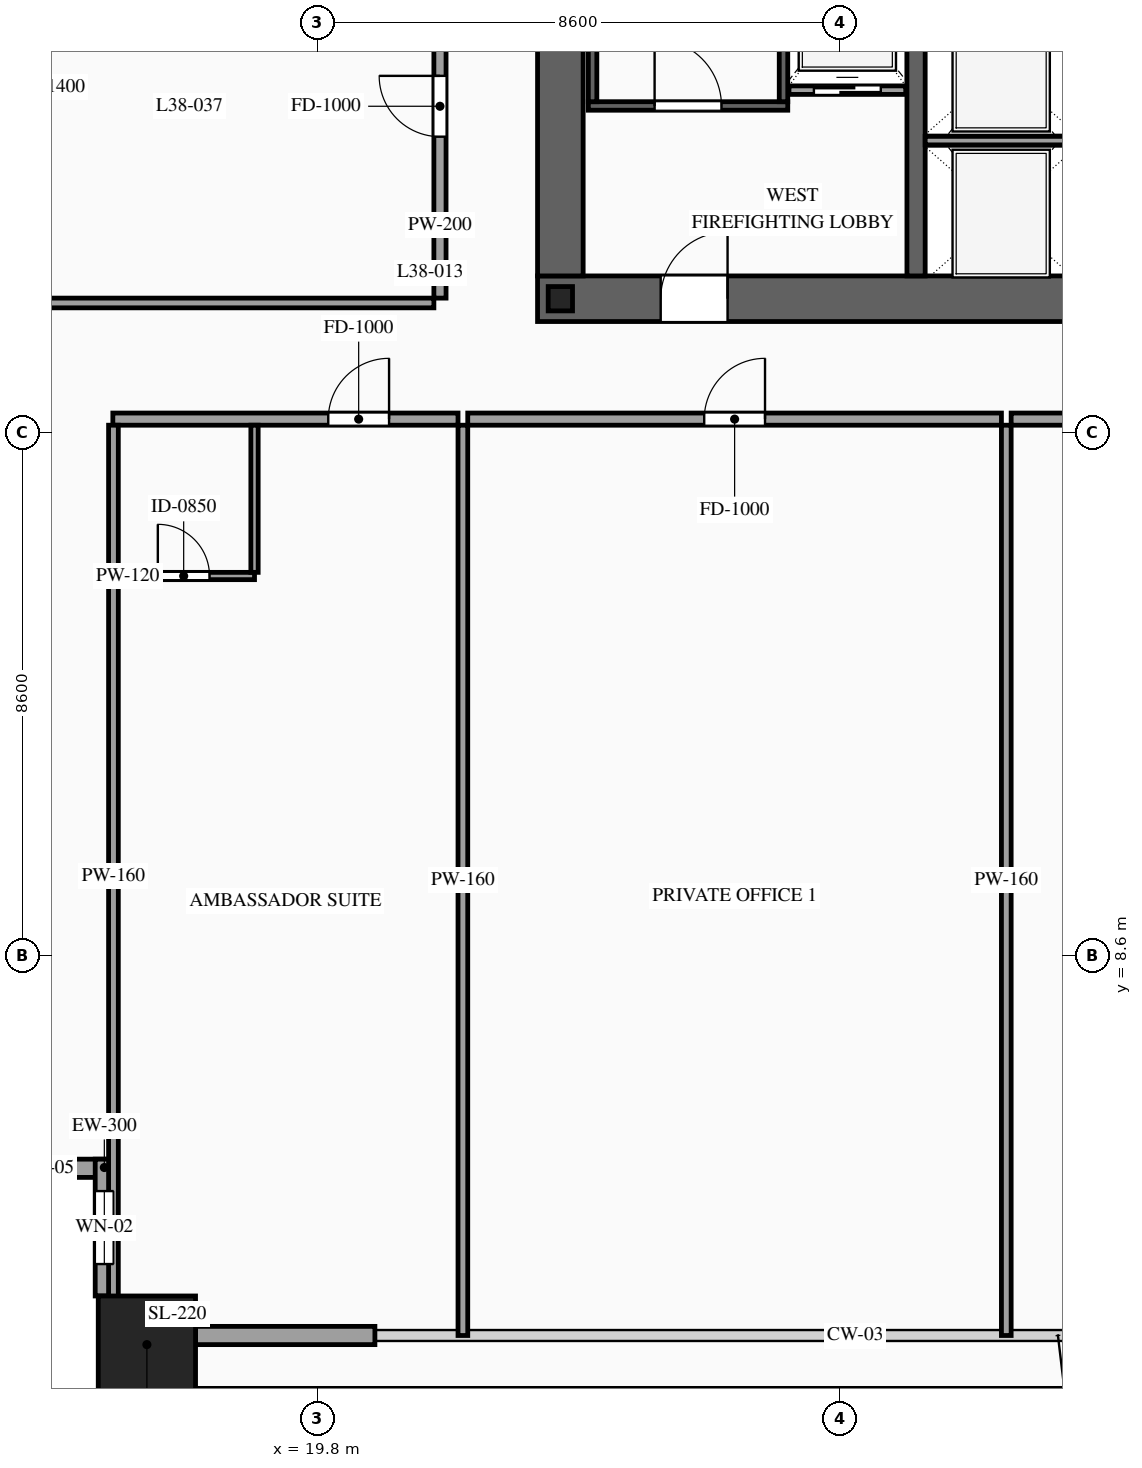
"""IFC4 building model, lengths in metres.
Left out: names, types, materials, properties, quantities, classifications, styles, units other than length and angle.
Written with IfcOpenShell. Run it as: python <this file> out.ifc"""

import sys

from ifc_helpers import new_model, si_unit, direction, frame, frame_2d, origin, origin_2d, place, context, subcontext, project, spatial, rectangle, hollow_rectangle, i_section, extrude, source, transform, mapped, element, fill, save


model = new_model("IFC4")
c1 = context("Model", 3, precision=1e-05, world=origin(), true_north=direction((0.0, 1.0)))
c2 = subcontext(c1, "Body", "Model", "MODEL_VIEW")
j1 = project(units=[si_unit("LENGTHUNIT", "METRE"), si_unit("PLANEANGLEUNIT", "RADIAN")], contexts=[c1])
p1 = place(None, origin())
s1 = spatial("IfcSite", under=j1, at=p1, CompositionType="ELEMENT")
p2 = place(p1, origin())
s2 = spatial("IfcBuilding", under=s1, at=p2, CompositionType="ELEMENT")
p3 = place(p2, frame((0.0, 0.0, 145.2)))
s3 = spatial("IfcBuildingStorey", under=s2, at=p3, CompositionType="ELEMENT", Elevation=145.2)
p4 = place(p3, frame((23.425, 19.4, 0.0), z_axis=(0.0, 0.0, 1.0), x_axis=(1.0, 0.0, 0.0)))
e1 = element("IfcWall", 1, at=p4, inside=s3, PredefinedType="SHEAR", context=c2, shape_type="SweptSolid", body=[
    extrude(rectangle(XDim=27.15, YDim=0.75, at=frame_2d((13.575, 0.0))), origin(), (0.0, 0.0, 1.0), 3.6),
])
p5 = place(p4, frame((2.025, 0.0, 0.0)))
e2 = element("IfcOpeningElement", 2, at=p5, cuts=e1, PredefinedType="OPENING", context=c2, shape_type="SweptSolid", body=[
    extrude(rectangle(XDim=1.1, YDim=2.2, at=frame_2d((0.55, 1.1))), frame((0.0, 0.39, 0.0), z_axis=(0.0, -1.0, 0.0), x_axis=(1.0, 0.0, 0.0)), (0.0, 0.0, 1.0), 0.78),
])
p6 = place(p4, frame((9.925, 0.0, 0.0)))
e3 = element("IfcOpeningElement", 3, at=p6, cuts=e1, PredefinedType="OPENING", context=c2, shape_type="SweptSolid", body=[
    extrude(rectangle(XDim=1.1, YDim=2.2, at=frame_2d((0.55, 1.1))), frame((0.0, 0.39, 0.0), z_axis=(0.0, -1.0, 0.0), x_axis=(1.0, 0.0, 0.0)), (0.0, 0.0, 1.0), 0.78),
])
p7 = place(p4, frame((23.125, 0.0, 0.0)))
e4 = element("IfcOpeningElement", 4, at=p7, cuts=e1, PredefinedType="OPENING", context=c2, shape_type="SweptSolid", body=[
    extrude(rectangle(XDim=1.1, YDim=2.2, at=frame_2d((0.55, 1.1))), frame((0.0, 0.39, 0.0), z_axis=(0.0, -1.0, 0.0), x_axis=(1.0, 0.0, 0.0)), (0.0, 0.0, 1.0), 0.78),
])
p8 = place(p4, frame((19.745, 0.0, 0.0)))
e5 = element("IfcOpeningElement", 5, at=p8, cuts=e1, PredefinedType="OPENING", context=c2, shape_type="SweptSolid", body=[
    extrude(rectangle(XDim=0.9, YDim=2.15, at=frame_2d((0.45, 1.075))), frame((0.0, 0.39, 0.0), z_axis=(0.0, -1.0, 0.0), x_axis=(1.0, 0.0, 0.0)), (0.0, 0.0, 1.0), 0.78),
])
p9 = place(p4, frame((18.305, 0.0, 0.0)))
e6 = element("IfcOpeningElement", 6, at=p9, cuts=e1, PredefinedType="OPENING", context=c2, shape_type="SweptSolid", body=[
    extrude(rectangle(XDim=0.9, YDim=2.15, at=frame_2d((0.45, 1.075))), frame((0.0, 0.39, 0.0), z_axis=(0.0, -1.0, 0.0), x_axis=(1.0, 0.0, 0.0)), (0.0, 0.0, 1.0), 0.78),
])
m1 = source(origin(), c2, "Body", "SweptSolid", [
    extrude(rectangle(XDim=12.05, YDim=0.75, at=frame_2d((6.025, 0.0))), origin(), (0.0, 0.0, 1.0), 3.6),
])
p10 = place(p3, frame((23.8, 19.775, 0.0), z_axis=(0.0, 0.0, 1.0), x_axis=(0.0, 1.0, 0.0)))
e7 = element("IfcWall", 7, at=p10, inside=s3, PredefinedType="SHEAR", context=c2, shape_type="MappedRepresentation", body=[
    mapped(m1, transform((0.0, 0.0, 0.0), scale=1.0)),
])
m2 = source(origin(), c2, "Body", "SweptSolid", [
    extrude(rectangle(XDim=12.05, YDim=0.3, at=frame_2d((6.025, 0.0))), origin(), (0.0, 0.0, 1.0), 3.6),
])
p11 = place(p3, frame((29.65, 19.775, 0.0), z_axis=(0.0, 0.0, 1.0), x_axis=(0.0, 1.0, 0.0)))
e8 = element("IfcWall", 8, at=p11, inside=s3, PredefinedType="SOLIDWALL", context=c2, shape_type="MappedRepresentation", body=[
    mapped(m2, transform((0.0, 0.0, 0.0), scale=1.0)),
])
m3 = source(origin(), c2, "Body", "SweptSolid", [
    extrude(i_section(OverallWidth=0.4, OverallDepth=0.4, WebThickness=0.013, FlangeThickness=0.021, at=origin_2d()), origin(), (0.0, 0.0, 1.0), 3.6),
])
p12 = place(p3, frame((23.8, 19.4, 0.0), z_axis=(0.0, 0.0, 1.0), x_axis=(1.0, 0.0, 0.0)))
e9 = element("IfcColumn", 9, at=p12, inside=s3, PredefinedType="COLUMN", context=c2, shape_type="MappedRepresentation", body=[
    mapped(m3, transform((0.0, 0.0, 0.0), scale=1.0)),
])
m4 = source(origin(), c2, "Body", "SweptSolid", [
    extrude(hollow_rectangle(XDim=1.6, YDim=1.6, WallThickness=0.07, at=origin_2d()), origin(), (0.0, 0.0, 1.0), 3.6),
])
p13 = place(p3, frame((17.0, 2.2, 0.0), z_axis=(0.0, 0.0, 1.0), x_axis=(1.0, 0.0, 0.0)))
e10 = element("IfcColumn", 10, at=p13, inside=s3, PredefinedType="COLUMN", context=c2, shape_type="MappedRepresentation", body=[
    mapped(m4, transform((0.0, 0.0, 0.0), scale=1.0)),
])
p14 = place(p3, frame((14.2, 5.1, 0.0), z_axis=(0.0, 0.0, 1.0), x_axis=(1.0, 0.0, 0.0)))
e11 = element("IfcWall", 11, at=p14, inside=s3, PredefinedType="SOLIDWALL", context=c2, shape_type="SweptSolid", body=[
    extrude(rectangle(XDim=2.25, YDim=0.3, at=frame_2d((1.125, 0.0))), origin(), (0.0, 0.0, 1.0), 3.38),
])
p15 = place(p14, frame((0.675, 0.0, 0.85)))
e12 = element("IfcOpeningElement", 12, at=p15, cuts=e11, PredefinedType="OPENING", context=c2, shape_type="SweptSolid", body=[
    extrude(rectangle(XDim=0.9, YDim=1.5, at=frame_2d((0.45, 0.75))), frame((0.0, 0.165, 0.0), z_axis=(0.0, -1.0, 0.0), x_axis=(1.0, 0.0, 0.0)), (0.0, 0.0, 1.0), 0.33),
])
p16 = place(p3, frame((16.3, 5.25, 0.0), z_axis=(0.0, 0.0, 1.0), x_axis=(0.0, -1.0, 0.0)))
e13 = element("IfcWall", 13, at=p16, inside=s3, PredefinedType="SOLIDWALL", context=c2, shape_type="SweptSolid", body=[
    extrude(rectangle(XDim=2.25, YDim=0.3, at=frame_2d((1.125, 0.0))), origin(), (0.0, 0.0, 1.0), 3.38),
])
p17 = place(p16, frame((0.525, 0.0, 0.85)))
e14 = element("IfcOpeningElement", 14, at=p17, cuts=e13, PredefinedType="OPENING", context=c2, shape_type="SweptSolid", body=[
    extrude(rectangle(XDim=1.2, YDim=2.1, at=frame_2d((0.6, 1.05))), frame((0.0, 0.165, 0.0), z_axis=(0.0, -1.0, 0.0), x_axis=(1.0, 0.0, 0.0)), (0.0, 0.0, 1.0), 0.33),
])
m5 = source(origin(), c2, "Body", "SweptSolid", [
    extrude(rectangle(XDim=2.95, YDim=0.3, at=frame_2d((1.475, 0.0))), origin(), (0.0, 0.0, 1.0), 2.775),
])
p18 = place(p3, frame((17.8, 2.35, 0.0), z_axis=(0.0, 0.0, 1.0), x_axis=(1.0, 0.0, 0.0)))
e15 = element("IfcWall", 15, at=p18, inside=s3, PredefinedType="SOLIDWALL", context=c2, shape_type="MappedRepresentation", body=[
    mapped(m5, transform((0.0, 0.0, 0.0), scale=1.0)),
])
p19 = place(p3, frame((27.56, 22.83, 0.0), z_axis=(0.0, 0.0, 1.0), x_axis=(1.0, 0.0, 0.0)))
e16 = element("IfcWall", 16, at=p19, inside=s3, PredefinedType="SOLIDWALL", context=c2, shape_type="SweptSolid", body=[
    extrude(rectangle(XDim=1.92, YDim=0.14, at=frame_2d((0.96, 0.0))), origin(), (0.0, 0.0, 1.0), 3.38),
])
p20 = place(p19, frame((0.41, 0.0, 0.0)))
e17 = element("IfcOpeningElement", 17, at=p20, cuts=e16, PredefinedType="OPENING", context=c2, shape_type="SweptSolid", body=[
    extrude(rectangle(XDim=1.1, YDim=2.2, at=frame_2d((0.55, 1.1))), frame((0.0, 0.085, 0.0), z_axis=(0.0, -1.0, 0.0), x_axis=(1.0, 0.0, 0.0)), (0.0, 0.0, 1.0), 0.17),
])
m6 = source(origin(), c2, "Body", "SweptSolid", [
    extrude(rectangle(XDim=2.5, YDim=0.14, at=frame_2d((1.25, 0.0))), origin(), (0.0, 0.0, 1.0), 3.38),
])
p21 = place(p3, frame((29.8, 22.0, 0.0), z_axis=(0.0, 0.0, 1.0), x_axis=(1.0, 0.0, 0.0)))
e18 = element("IfcWall", 18, at=p21, inside=s3, PredefinedType="SOLIDWALL", context=c2, shape_type="MappedRepresentation", body=[
    mapped(m6, transform((0.0, 0.0, 0.0), scale=1.0)),
])
p22 = place(p3, frame((24.26, 22.57, 0.0), z_axis=(0.0, 0.0, 1.0), x_axis=(1.0, 0.0, 0.0)))
e19 = element("IfcWall", 19, at=p22, inside=s3, PredefinedType="SOLIDWALL", context=c2, shape_type="SweptSolid", body=[
    extrude(rectangle(XDim=3.28, YDim=0.14, at=frame_2d((1.64, 0.0))), origin(), (0.0, 0.0, 1.0), 3.38),
])
p23 = place(p22, frame((1.09, 0.0, 0.0)))
e20 = element("IfcOpeningElement", 20, at=p23, cuts=e19, PredefinedType="OPENING", context=c2, shape_type="SweptSolid", body=[
    extrude(rectangle(XDim=1.1, YDim=2.2, at=frame_2d((0.55, 1.1))), frame((0.0, 0.085, 0.0), z_axis=(0.0, -1.0, 0.0), x_axis=(1.0, 0.0, 0.0)), (0.0, 0.0, 1.0), 0.17),
])
m7 = source(origin(), c2, "Body", "SweptSolid", [
    extrude(rectangle(XDim=8.94, YDim=0.14, at=frame_2d((4.47, 0.0))), origin(), (0.0, 0.0, 1.0), 3.38),
])
for number, where, z_axis, x_axis in (
    (21, (24.33, 22.64, 0.0), (0.0, 0.0, 1.0), (0.0, 1.0, 0.0)),
    (22, (27.47, 22.64, 0.0), (0.0, 0.0, 1.0), (0.0, 1.0, 0.0)),
):
    element("IfcWall", number, at=place(p3, frame(where, z_axis=z_axis, x_axis=x_axis)), inside=s3, PredefinedType="SOLIDWALL", context=c2, shape_type="MappedRepresentation", body=[
        mapped(m7, transform((0.0, 0.0, 0.0), scale=1.0)),
    ])
p24 = place(p3, frame((16.44, 17.42, 0.0), z_axis=(0.0, 0.0, 1.0), x_axis=(1.0, 0.0, 0.0)))
e23 = element("IfcWall", 23, at=p24, inside=s3, PredefinedType="PARTITIONING", context=c2, shape_type="SweptSolid", body=[
    extrude(rectangle(XDim=5.677, YDim=0.2, at=frame_2d((2.838, 0.0))), origin(), (0.0, 0.0, 1.0), 3.38),
])
p25 = place(p24, frame((3.543, 0.0, 0.0)))
e24 = element("IfcOpeningElement", 24, at=p25, cuts=e23, PredefinedType="OPENING", context=c2, shape_type="SweptSolid", body=[
    extrude(rectangle(XDim=1.0, YDim=2.2, at=frame_2d((0.5, 1.1))), frame((0.0, 0.115, 0.0), z_axis=(0.0, -1.0, 0.0), x_axis=(1.0, 0.0, 0.0)), (0.0, 0.0, 1.0), 0.23),
])
m8 = source(origin(), c2, "Body", "SweptSolid", [
    extrude(rectangle(XDim=14.97, YDim=0.16, at=frame_2d((7.485, 0.0))), origin(), (0.0, 0.0, 1.0), 3.38),
])
p26 = place(p3, frame((22.197, 2.35, 0.0), z_axis=(0.0, 0.0, 1.0), x_axis=(0.0, 1.0, 0.0)))
e25 = element("IfcWall", 25, at=p26, inside=s3, PredefinedType="PARTITIONING", context=c2, shape_type="MappedRepresentation", body=[
    mapped(m8, transform((0.0, 0.0, 0.0), scale=1.0)),
])
p27 = place(p3, frame((16.44, 14.84, 0.0), z_axis=(0.0, 0.0, 1.0), x_axis=(1.0, 0.0, 0.0)))
e26 = element("IfcWall", 26, at=p27, inside=s3, PredefinedType="PARTITIONING", context=c2, shape_type="SweptSolid", body=[
    extrude(rectangle(XDim=2.33, YDim=0.12, at=frame_2d((1.165, 0.0))), origin(), (0.0, 0.0, 1.0), 3.38),
])
p28 = place(p27, frame((0.74, 0.0, 0.0)))
e27 = element("IfcOpeningElement", 27, at=p28, cuts=e26, PredefinedType="OPENING", context=c2, shape_type="SweptSolid", body=[
    extrude(rectangle(XDim=0.85, YDim=2.1, at=frame_2d((0.425, 1.05))), frame((0.0, 0.075, 0.0), z_axis=(0.0, -1.0, 0.0), x_axis=(1.0, 0.0, 0.0)), (0.0, 0.0, 1.0), 0.15),
])
m9 = source(origin(), c2, "Body", "SweptSolid", [
    extrude(rectangle(XDim=2.42, YDim=0.12, at=frame_2d((1.21, 0.0))), origin(), (0.0, 0.0, 1.0), 3.38),
])
p29 = place(p3, frame((18.77, 14.9, 0.0), z_axis=(0.0, 0.0, 1.0), x_axis=(0.0, 1.0, 0.0)))
e28 = element("IfcWall", 28, at=p29, inside=s3, PredefinedType="PARTITIONING", context=c2, shape_type="MappedRepresentation", body=[
    mapped(m9, transform((0.0, 0.0, 0.0), scale=1.0)),
])
p30 = place(p3, frame((22.277, 17.42, 0.0), z_axis=(0.0, 0.0, 1.0), x_axis=(1.0, 0.0, 0.0)))
e29 = element("IfcWall", 29, at=p30, inside=s3, PredefinedType="PARTITIONING", context=c2, shape_type="SweptSolid", body=[
    extrude(rectangle(XDim=8.777, YDim=0.2, at=frame_2d((4.388, 0.0))), origin(), (0.0, 0.0, 1.0), 3.38),
])
p31 = place(p30, frame((3.889, 0.0, 0.0)))
e30 = element("IfcOpeningElement", 30, at=p31, cuts=e29, PredefinedType="OPENING", context=c2, shape_type="SweptSolid", body=[
    extrude(rectangle(XDim=1.0, YDim=2.2, at=frame_2d((0.5, 1.1))), frame((0.0, 0.115, 0.0), z_axis=(0.0, -1.0, 0.0), x_axis=(1.0, 0.0, 0.0)), (0.0, 0.0, 1.0), 0.23),
])
p32 = place(p3, frame((31.134, 2.35, 0.0), z_axis=(0.0, 0.0, 1.0), x_axis=(0.0, 1.0, 0.0)))
e31 = element("IfcWall", 31, at=p32, inside=s3, PredefinedType="PARTITIONING", context=c2, shape_type="MappedRepresentation", body=[
    mapped(m8, transform((0.0, 0.0, 0.0), scale=1.0)),
])
p33 = place(p3, frame((31.214, 17.42, 0.0), z_axis=(0.0, 0.0, 1.0), x_axis=(1.0, 0.0, 0.0)))
e32 = element("IfcWall", 32, at=p33, inside=s3, PredefinedType="PARTITIONING", context=c2, shape_type="SweptSolid", body=[
    extrude(rectangle(XDim=4.061, YDim=0.2, at=frame_2d((2.03, 0.0))), origin(), (0.0, 0.0, 1.0), 3.38),
])
p34 = place(p33, frame((1.531, 0.0, 0.0)))
e33 = element("IfcOpeningElement", 33, at=p34, cuts=e32, PredefinedType="OPENING", context=c2, shape_type="SweptSolid", body=[
    extrude(rectangle(XDim=1.0, YDim=2.2, at=frame_2d((0.5, 1.1))), frame((0.0, 0.115, 0.0), z_axis=(0.0, -1.0, 0.0), x_axis=(1.0, 0.0, 0.0)), (0.0, 0.0, 1.0), 0.23),
])
m10 = source(origin(), c2, "Body", "SweptSolid", [
    extrude(rectangle(XDim=14.82, YDim=0.16, at=frame_2d((7.41, 0.0))), origin(), (0.0, 0.0, 1.0), 3.38),
])
p35 = place(p3, frame((16.45, 2.5, 0.0), z_axis=(0.0, 0.0, 1.0), x_axis=(0.0, 1.0, 0.0)))
e34 = element("IfcWall", 34, at=p35, inside=s3, PredefinedType="PARTITIONING", context=c2, shape_type="MappedRepresentation", body=[
    mapped(m10, transform((0.0, 0.0, 0.0), scale=1.0)),
])
p36 = place(p3, frame((21.82, 19.41, 0.0), z_axis=(0.0, 0.0, 1.0), x_axis=(0.0, 1.0, 0.0)))
e35 = element("IfcWall", 35, at=p36, inside=s3, PredefinedType="PARTITIONING", context=c2, shape_type="SweptSolid", body=[
    extrude(rectangle(XDim=6.31, YDim=0.2, at=frame_2d((3.155, 0.0))), origin(), (0.0, 0.0, 1.0), 3.38),
])
p37 = place(p36, frame((2.655, 0.0, 0.0)))
e36 = element("IfcOpeningElement", 36, at=p37, cuts=e35, PredefinedType="OPENING", context=c2, shape_type="SweptSolid", body=[
    extrude(rectangle(XDim=1.0, YDim=2.2, at=frame_2d((0.5, 1.1))), frame((0.0, 0.115, 0.0), z_axis=(0.0, -1.0, 0.0), x_axis=(1.0, 0.0, 0.0)), (0.0, 0.0, 1.0), 0.23),
])
m11 = source(origin(), c2, "Body", "SweptSolid", [
    extrude(rectangle(XDim=8.17, YDim=0.16, at=frame_2d((4.085, 0.0))), origin(), (0.0, 0.0, 1.0), 2.875),
])
p38 = place(p3, frame((13.55, 19.33, 0.0), z_axis=(0.0, 0.0, 1.0), x_axis=(1.0, 0.0, 0.0)))
e37 = element("IfcWall", 37, at=p38, inside=s3, PredefinedType="PARTITIONING", context=c2, shape_type="MappedRepresentation", body=[
    mapped(m11, transform((0.0, 0.0, 0.0), scale=1.0)),
])
m12 = source(origin(), c2, "Body", "SweptSolid", [
    extrude(rectangle(XDim=0.9, YDim=1.5, at=frame_2d((0.45, 0.75))), frame((0.0, 0.03, 0.0), z_axis=(0.0, -1.0, 0.0), x_axis=(1.0, 0.0, 0.0)), (0.0, 0.0, 1.0), 0.06),
])
p39 = place(p15, origin())
e38 = element("IfcWindow", 38, at=p39, inside=s3, PartitioningType="SINGLE_PANEL", PredefinedType="WINDOW", context=c2, shape_type="MappedRepresentation", body=[
    mapped(m12, transform((0.0, 0.0, 0.0), scale=1.0)),
])
fill(e12, e38)
m13 = source(origin(), c2, "Body", "SweptSolid", [
    extrude(rectangle(XDim=1.2, YDim=2.1, at=frame_2d((0.6, 1.05))), frame((0.0, 0.03, 0.0), z_axis=(0.0, -1.0, 0.0), x_axis=(1.0, 0.0, 0.0)), (0.0, 0.0, 1.0), 0.06),
])
p40 = place(p17, origin())
e39 = element("IfcWindow", 39, at=p40, inside=s3, PartitioningType="SINGLE_PANEL", PredefinedType="WINDOW", context=c2, shape_type="MappedRepresentation", body=[
    mapped(m13, transform((0.0, 0.0, 0.0), scale=1.0)),
])
fill(e14, e39)
m14 = source(origin(), c2, "Body", "SweptSolid", [
    extrude(rectangle(XDim=1.1, YDim=2.2, at=frame_2d((0.55, 1.1))), frame((0.0, 0.025, 0.0), z_axis=(0.0, -1.0, 0.0), x_axis=(1.0, 0.0, 0.0)), (0.0, 0.0, 1.0), 0.05),
])
p41 = place(p20, origin())
e40 = element("IfcDoor", 40, at=p41, inside=s3, OperationType="SLIDING_TO_LEFT", PredefinedType="DOOR", context=c2, shape_type="MappedRepresentation", body=[
    mapped(m14, transform((0.0, 0.0, 0.0), scale=1.0)),
])
fill(e17, e40)
m15 = source(origin(), c2, "Body", "SweptSolid", [
    extrude(rectangle(XDim=1.1, YDim=2.2, at=frame_2d((0.55, 1.1))), frame((0.0, 0.025, 0.0), z_axis=(0.0, -1.0, 0.0), x_axis=(1.0, 0.0, 0.0)), (0.0, 0.0, 1.0), 0.05),
])
p42 = place(p23, origin())
e41 = element("IfcDoor", 41, at=p42, inside=s3, OperationType="SINGLE_SWING_LEFT", PredefinedType="DOOR", context=c2, shape_type="MappedRepresentation", body=[
    mapped(m15, transform((0.0, 0.0, 0.0), scale=1.0)),
])
fill(e20, e41)
p43 = place(p5, origin())
e42 = element("IfcDoor", 42, at=p43, inside=s3, OperationType="SINGLE_SWING_RIGHT", PredefinedType="DOOR", context=c2, shape_type="MappedRepresentation", body=[
    mapped(m15, transform((0.0, 0.0, 0.0), scale=1.0)),
])
fill(e2, e42)
m16 = source(origin(), c2, "Body", "SweptSolid", [
    extrude(rectangle(XDim=1.0, YDim=2.2, at=frame_2d((0.5, 1.1))), frame((0.0, 0.025, 0.0), z_axis=(0.0, -1.0, 0.0), x_axis=(1.0, 0.0, 0.0)), (0.0, 0.0, 1.0), 0.05),
])
p44 = place(p25, origin())
e43 = element("IfcDoor", 43, at=p44, inside=s3, OperationType="SINGLE_SWING_RIGHT", PredefinedType="DOOR", context=c2, shape_type="MappedRepresentation", body=[
    mapped(m16, transform((0.0, 0.0, 0.0), scale=1.0)),
])
fill(e24, e43)
m17 = source(origin(), c2, "Body", "SweptSolid", [
    extrude(rectangle(XDim=0.85, YDim=2.1, at=frame_2d((0.425, 1.05))), frame((0.0, 0.025, 0.0), z_axis=(0.0, -1.0, 0.0), x_axis=(1.0, 0.0, 0.0)), (0.0, 0.0, 1.0), 0.05),
])
p45 = place(p28, origin())
e44 = element("IfcDoor", 44, at=p45, inside=s3, OperationType="SINGLE_SWING_LEFT", PredefinedType="DOOR", context=c2, shape_type="MappedRepresentation", body=[
    mapped(m17, transform((0.0, 0.0, 0.0), scale=1.0)),
])
fill(e27, e44)
p46 = place(p31, origin())
e45 = element("IfcDoor", 45, at=p46, inside=s3, OperationType="SINGLE_SWING_RIGHT", PredefinedType="DOOR", context=c2, shape_type="MappedRepresentation", body=[
    mapped(m16, transform((0.0, 0.0, 0.0), scale=1.0)),
])
fill(e30, e45)
p47 = place(p37, origin())
e46 = element("IfcDoor", 46, at=p47, inside=s3, OperationType="SINGLE_SWING_RIGHT", PredefinedType="DOOR", context=c2, shape_type="MappedRepresentation", body=[
    mapped(m16, transform((0.0, 0.0, 0.0), scale=1.0)),
])
fill(e36, e46)
save(model, sys.argv[1])
